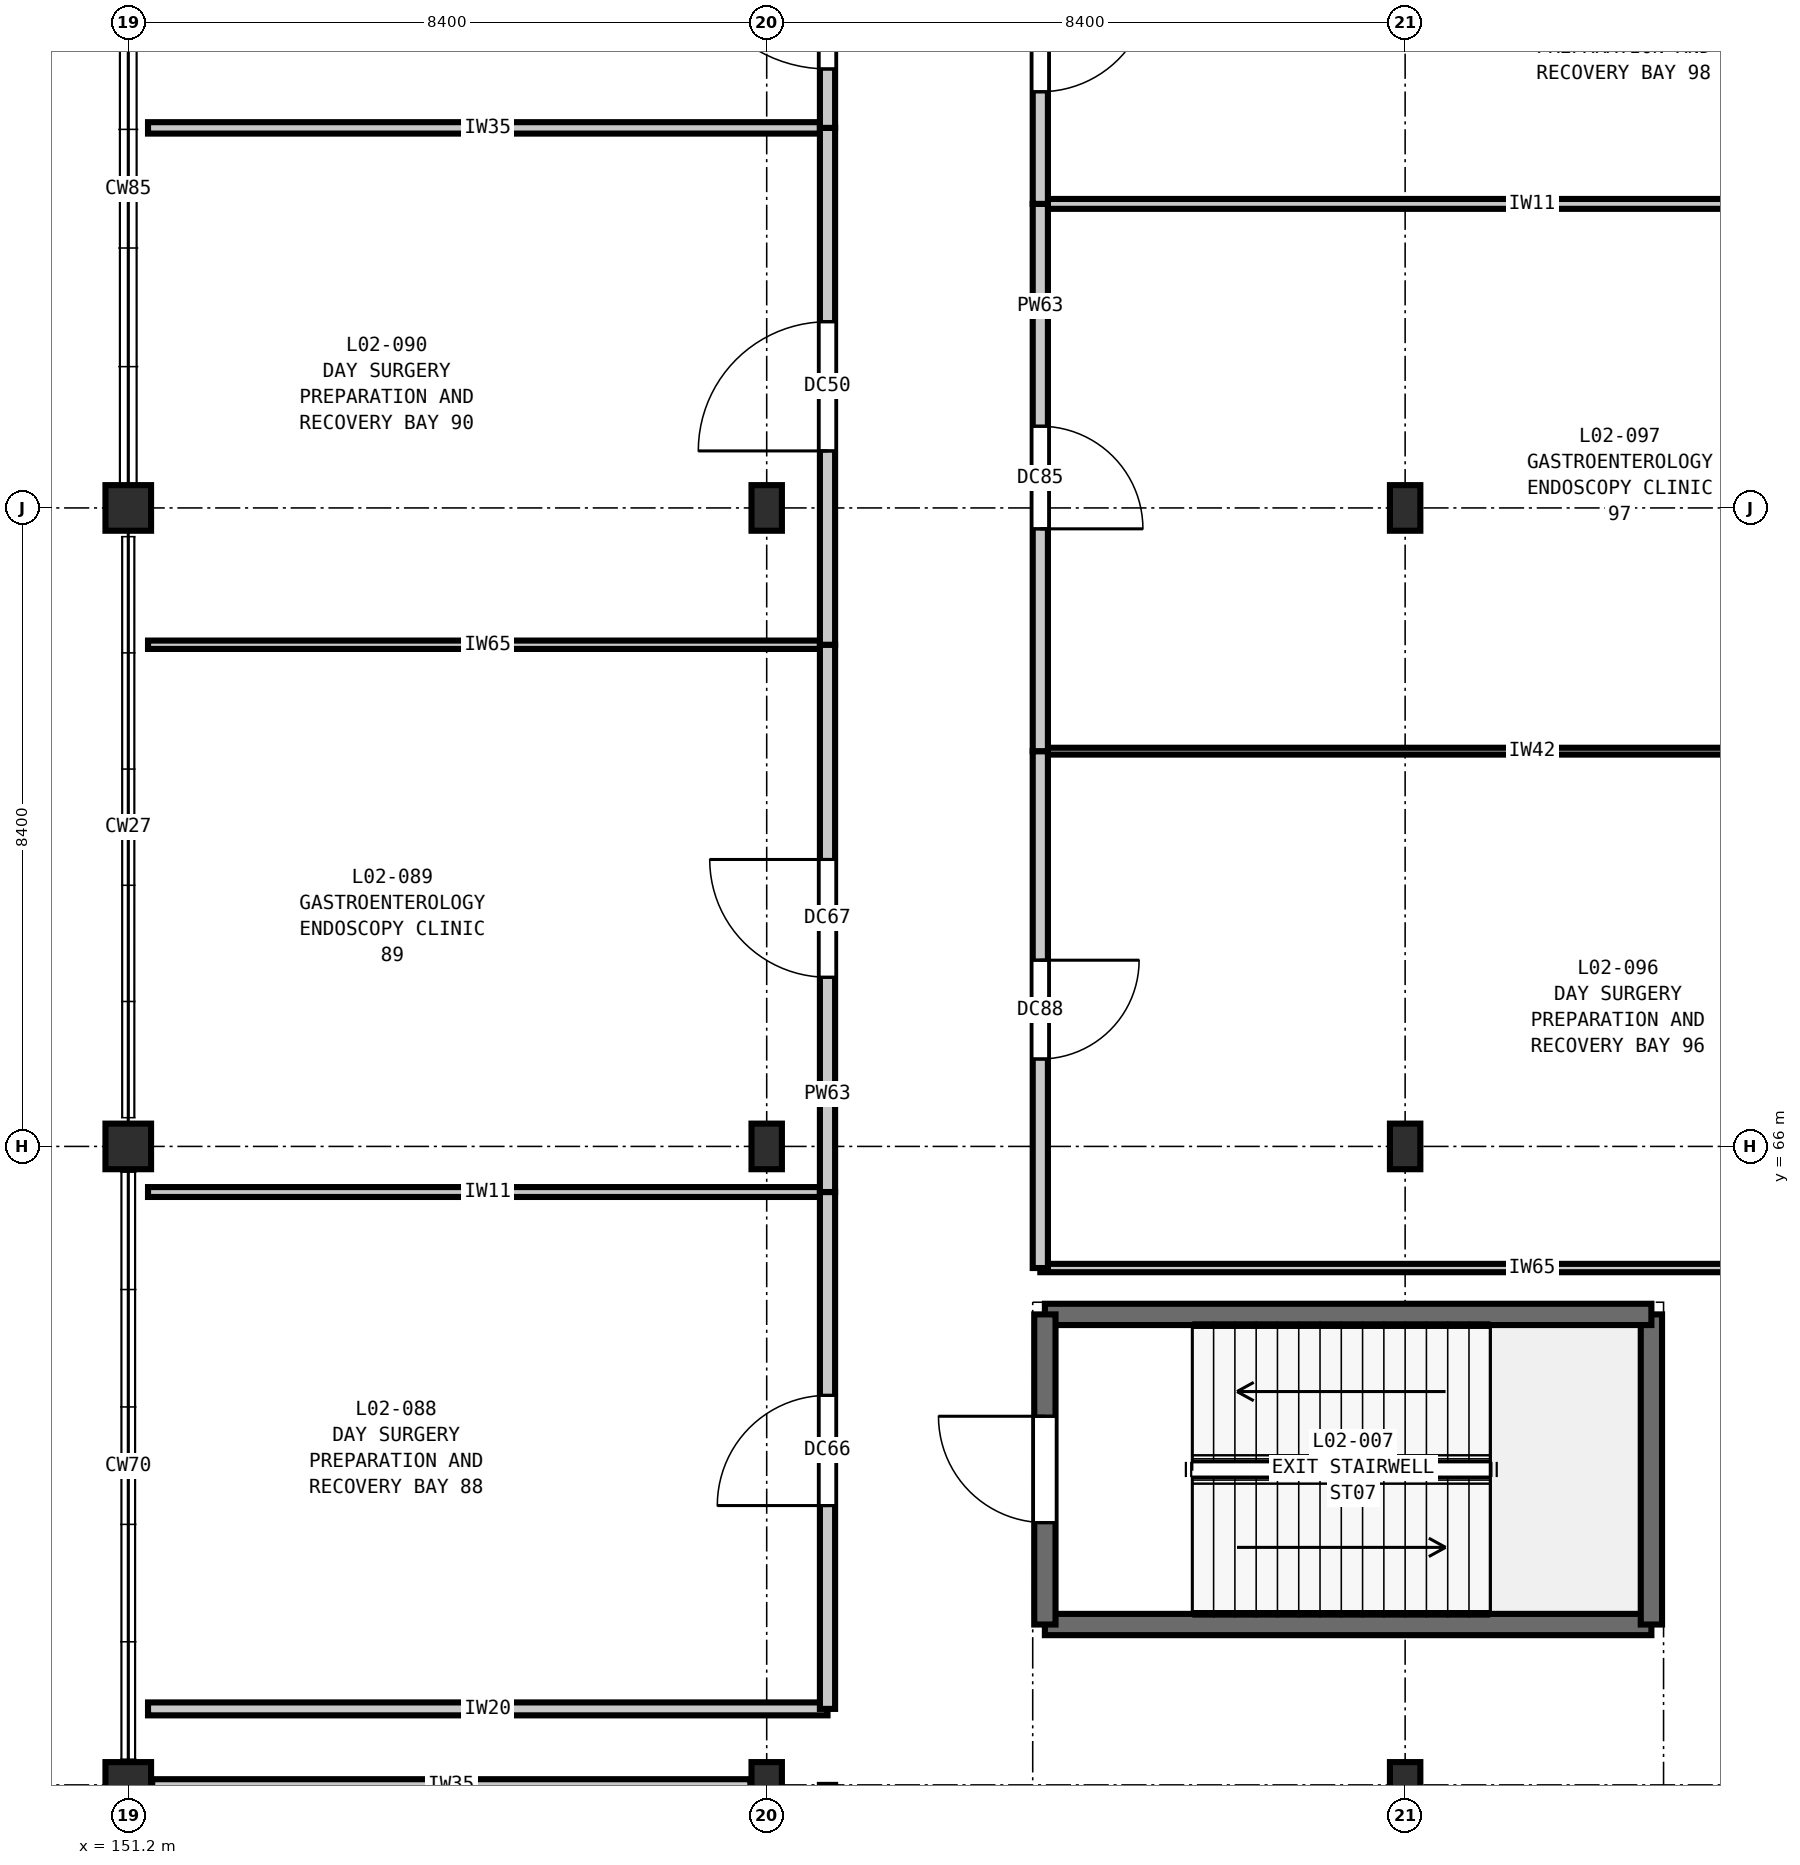
"""IFC4 building model, lengths in metres.
Left out: names, types, materials, properties, quantities, classifications, styles, units other than length and angle.
Written with IfcOpenShell. Run it as: python <this file> out.ifc"""

import sys

from ifc_helpers import new_model, si_unit, direction, frame, frame_2d, origin, origin_2d, place, context, subcontext, project, spatial, rectangle, extrude, element, fill, save


model = new_model("IFC4")
c1 = context("Model", 3, precision=1e-05, world=origin(), true_north=direction((0.0, 1.0)))
c2 = subcontext(c1, "Body", "Model", "MODEL_VIEW")
j1 = project(units=[si_unit("LENGTHUNIT", "METRE"), si_unit("PLANEANGLEUNIT", "RADIAN")], contexts=[c1])
p1 = place(None, origin())
s1 = spatial("IfcSite", under=j1, at=p1, CompositionType="ELEMENT")
p2 = place(p1, origin())
s2 = spatial("IfcBuilding", under=s1, at=p2, CompositionType="ELEMENT")
p3 = place(p2, frame((0.0, 0.0, 10.8)))
s3 = spatial("IfcBuildingStorey", under=s2, at=p3, CompositionType="ELEMENT", Elevation=10.8)
for number, where, z_axis, x_axis in (
    (1, (151.2, 57.6, 0.0), (0.0, 0.0, 1.0), (1.0, 0.0, 0.0)),
    (2, (151.2, 66.0, 0.0), (0.0, 0.0, 1.0), (1.0, 0.0, 0.0)),
    (3, (151.2, 74.4, 0.0), (0.0, 0.0, 1.0), (1.0, 0.0, 0.0)),
):
    element("IfcColumn", number, at=place(p3, frame(where, z_axis=z_axis, x_axis=x_axis)), inside=s3, PredefinedType="COLUMN", context=c2, shape_type="SweptSolid", body=[
        extrude(rectangle(XDim=0.6, YDim=0.6, at=origin_2d()), origin(), (0.0, 0.0, 1.0), 5.4),
    ])
for number, where, z_axis, x_axis in (
    (4, (159.6, 57.6, 0.0), (0.0, 0.0, 1.0), (1.0, 0.0, 0.0)),
    (5, (159.6, 66.0, 0.0), (0.0, 0.0, 1.0), (1.0, 0.0, 0.0)),
    (6, (159.6, 74.4, 0.0), (0.0, 0.0, 1.0), (1.0, 0.0, 0.0)),
    (7, (168.0, 57.6, 0.0), (0.0, 0.0, 1.0), (1.0, 0.0, 0.0)),
    (8, (168.0, 66.0, 0.0), (0.0, 0.0, 1.0), (1.0, 0.0, 0.0)),
    (9, (168.0, 74.4, 0.0), (0.0, 0.0, 1.0), (1.0, 0.0, 0.0)),
):
    element("IfcColumn", number, at=place(p3, frame(where, z_axis=z_axis, x_axis=x_axis)), inside=s3, PredefinedType="COLUMN", context=c2, shape_type="SweptSolid", body=[
        extrude(rectangle(XDim=0.4, YDim=0.6, at=origin_2d()), origin(), (0.0, 0.0, 1.0), 5.4),
    ])
p4 = place(p3, frame((163.26, 59.71, 0.0), z_axis=(0.0, 0.0, 1.0), x_axis=(1.0, 0.0, 0.0)))
e10 = element("IfcWall", 10, at=p4, inside=s3, PredefinedType="SHEAR", context=c2, shape_type="SweptSolid", body=[
    extrude(rectangle(XDim=7.98, YDim=0.28, at=frame_2d((3.99, 0.0))), origin(), (0.0, 0.0, 1.0), 5.4),
])
p5 = place(p3, frame((171.24, 59.71, 0.0), z_axis=(0.0, 0.0, 1.0), x_axis=(0.0, 1.0, 0.0)))
e11 = element("IfcWall", 11, at=p5, inside=s3, PredefinedType="SHEAR", context=c2, shape_type="SweptSolid", body=[
    extrude(rectangle(XDim=4.08, YDim=0.28, at=frame_2d((2.04, 0.0))), origin(), (0.0, 0.0, 1.0), 5.4),
])
p6 = place(p3, frame((171.24, 63.79, 0.0), z_axis=(0.0, 0.0, 1.0), x_axis=(-1.0, 0.0, 0.0)))
e12 = element("IfcWall", 12, at=p6, inside=s3, PredefinedType="SHEAR", context=c2, shape_type="SweptSolid", body=[
    extrude(rectangle(XDim=7.98, YDim=0.28, at=frame_2d((3.99, 0.0))), origin(), (0.0, 0.0, 1.0), 5.4),
])
p7 = place(p3, frame((163.26, 63.79, 0.0), z_axis=(0.0, 0.0, 1.0), x_axis=(0.0, -1.0, 0.0)))
e13 = element("IfcWall", 13, at=p7, inside=s3, PredefinedType="SHEAR", context=c2, shape_type="SweptSolid", body=[
    extrude(rectangle(XDim=4.08, YDim=0.28, at=frame_2d((2.04, 0.0))), origin(), (0.0, 0.0, 1.0), 5.4),
])
p8 = place(p7, frame((1.34, 0.0, 0.0)))
e14 = element("IfcOpeningElement", 14, at=p8, cuts=e13, PredefinedType="OPENING", context=c2, shape_type="SweptSolid", body=[
    extrude(rectangle(XDim=1.4, YDim=2.2, at=frame_2d((0.7, 1.1))), frame((0.0, 0.15, 0.0), z_axis=(0.0, -1.0, 0.0), x_axis=(1.0, 0.0, 0.0)), (0.0, 0.0, 1.0), 0.3),
])
p9 = place(p3, frame((151.515, 57.6, 0.0), z_axis=(0.0, 0.0, 1.0), x_axis=(1.0, 0.0, 0.0)))
e15 = element("IfcWall", 15, at=p9, inside=s3, PredefinedType="PARTITIONING", context=c2, shape_type="SweptSolid", body=[
    extrude(rectangle(XDim=7.87, YDim=0.15, at=frame_2d((3.935, 0.0))), origin(), (0.0, 0.0, 1.0), 4.735),
])
p10 = place(p3, frame((151.46, 58.6, 0.0), z_axis=(0.0, 0.0, 1.0), x_axis=(1.0, 0.0, 0.0)))
e16 = element("IfcWall", 16, at=p10, inside=s3, PredefinedType="PARTITIONING", context=c2, shape_type="SweptSolid", body=[
    extrude(rectangle(XDim=8.94, YDim=0.17, at=frame_2d((4.47, 0.0))), origin(), (0.0, 0.0, 1.0), 5.07),
])
p11 = place(p3, frame((163.2, 64.4, 0.0), z_axis=(0.0, 0.0, 1.0), x_axis=(1.0, 0.0, 0.0)))
e17 = element("IfcWall", 17, at=p11, inside=s3, PredefinedType="PARTITIONING", context=c2, shape_type="SweptSolid", body=[
    extrude(rectangle(XDim=12.94, YDim=0.11, at=frame_2d((6.47, 0.0))), origin(), (0.0, 0.0, 1.0), 5.07),
])
p12 = place(p3, frame((151.46, 65.4, 0.0), z_axis=(0.0, 0.0, 1.0), x_axis=(1.0, 0.0, 0.0)))
e18 = element("IfcWall", 18, at=p12, inside=s3, PredefinedType="PARTITIONING", context=c2, shape_type="SweptSolid", body=[
    extrude(rectangle(XDim=8.94, YDim=0.13, at=frame_2d((4.47, 0.0))), origin(), (0.0, 0.0, 1.0), 5.07),
])
p13 = place(p3, frame((163.2, 71.2, 0.0), z_axis=(0.0, 0.0, 1.0), x_axis=(1.0, 0.0, 0.0)))
e19 = element("IfcWall", 19, at=p13, inside=s3, PredefinedType="PARTITIONING", context=c2, shape_type="SweptSolid", body=[
    extrude(rectangle(XDim=12.94, YDim=0.09, at=frame_2d((6.47, 0.0))), origin(), (0.0, 0.0, 1.0), 5.07),
])
p14 = place(p3, frame((151.46, 72.6, 0.0), z_axis=(0.0, 0.0, 1.0), x_axis=(1.0, 0.0, 0.0)))
e20 = element("IfcWall", 20, at=p14, inside=s3, PredefinedType="PARTITIONING", context=c2, shape_type="SweptSolid", body=[
    extrude(rectangle(XDim=8.94, YDim=0.11, at=frame_2d((4.47, 0.0))), origin(), (0.0, 0.0, 1.0), 5.07),
])
p15 = place(p3, frame((163.2, 78.4, 0.0), z_axis=(0.0, 0.0, 1.0), x_axis=(1.0, 0.0, 0.0)))
e21 = element("IfcWall", 21, at=p15, inside=s3, PredefinedType="PARTITIONING", context=c2, shape_type="SweptSolid", body=[
    extrude(rectangle(XDim=12.94, YDim=0.13, at=frame_2d((6.47, 0.0))), origin(), (0.0, 0.0, 1.0), 5.07),
])
p16 = place(p3, frame((151.46, 79.4, 0.0), z_axis=(0.0, 0.0, 1.0), x_axis=(1.0, 0.0, 0.0)))
e22 = element("IfcWall", 22, at=p16, inside=s3, PredefinedType="PARTITIONING", context=c2, shape_type="SweptSolid", body=[
    extrude(rectangle(XDim=8.94, YDim=0.15, at=frame_2d((4.47, 0.0))), origin(), (0.0, 0.0, 1.0), 5.07),
])
p17 = place(p3, frame((160.4, 58.6, 0.0), z_axis=(0.0, 0.0, 1.0), x_axis=(0.0, 1.0, 0.0)))
e23 = element("IfcWall", 23, at=p17, inside=s3, PredefinedType="PARTITIONING", context=c2, shape_type="SweptSolid", body=[
    extrude(rectangle(XDim=6.8, YDim=0.2, at=frame_2d((3.4, 0.0))), origin(), (0.0, 0.0, 1.0), 5.07),
])
p18 = place(p17, frame((2.675, 0.0, 0.0)))
e24 = element("IfcOpeningElement", 24, at=p18, cuts=e23, PredefinedType="OPENING", context=c2, shape_type="SweptSolid", body=[
    extrude(rectangle(XDim=1.45, YDim=2.25, at=frame_2d((0.725, 1.125))), frame((0.0, 0.11, 0.0), z_axis=(0.0, -1.0, 0.0), x_axis=(1.0, 0.0, 0.0)), (0.0, 0.0, 1.0), 0.22),
])
p19 = place(p3, frame((160.4, 65.4, 0.0), z_axis=(0.0, 0.0, 1.0), x_axis=(0.0, 1.0, 0.0)))
e25 = element("IfcWall", 25, at=p19, inside=s3, PredefinedType="PARTITIONING", context=c2, shape_type="SweptSolid", body=[
    extrude(rectangle(XDim=7.2, YDim=0.2, at=frame_2d((3.6, 0.0))), origin(), (0.0, 0.0, 1.0), 5.07),
])
p20 = place(p19, frame((2.825, 0.0, 0.0)))
e26 = element("IfcOpeningElement", 26, at=p20, cuts=e25, PredefinedType="OPENING", context=c2, shape_type="SweptSolid", body=[
    extrude(rectangle(XDim=1.55, YDim=2.25, at=frame_2d((0.775, 1.125))), frame((0.0, 0.11, 0.0), z_axis=(0.0, -1.0, 0.0), x_axis=(1.0, 0.0, 0.0)), (0.0, 0.0, 1.0), 0.22),
])
p21 = place(p3, frame((160.4, 72.6, 0.0), z_axis=(0.0, 0.0, 1.0), x_axis=(0.0, 1.0, 0.0)))
e27 = element("IfcWall", 27, at=p21, inside=s3, PredefinedType="PARTITIONING", context=c2, shape_type="SweptSolid", body=[
    extrude(rectangle(XDim=6.8, YDim=0.2, at=frame_2d((3.4, 0.0))), origin(), (0.0, 0.0, 1.0), 5.07),
])
p22 = place(p21, frame((2.55, 0.0, 0.0)))
e28 = element("IfcOpeningElement", 28, at=p22, cuts=e27, PredefinedType="OPENING", context=c2, shape_type="SweptSolid", body=[
    extrude(rectangle(XDim=1.7, YDim=2.3, at=frame_2d((0.85, 1.15))), frame((0.0, 0.11, 0.0), z_axis=(0.0, -1.0, 0.0), x_axis=(1.0, 0.0, 0.0)), (0.0, 0.0, 1.0), 0.22),
])
p23 = place(p3, frame((160.4, 79.4, 0.0), z_axis=(0.0, 0.0, 1.0), x_axis=(0.0, 1.0, 0.0)))
e29 = element("IfcWall", 29, at=p23, inside=s3, PredefinedType="PARTITIONING", context=c2, shape_type="SweptSolid", body=[
    extrude(rectangle(XDim=3.4, YDim=0.2, at=frame_2d((1.7, 0.0))), origin(), (0.0, 0.0, 1.0), 5.07),
])
p24 = place(p23, frame((0.775, 0.0, 0.0)))
e30 = element("IfcOpeningElement", 30, at=p24, cuts=e29, PredefinedType="OPENING", context=c2, shape_type="SweptSolid", body=[
    extrude(rectangle(XDim=1.85, YDim=2.3, at=frame_2d((0.925, 1.15))), frame((0.0, 0.11, 0.0), z_axis=(0.0, -1.0, 0.0), x_axis=(1.0, 0.0, 0.0)), (0.0, 0.0, 1.0), 0.22),
])
p25 = place(p3, frame((163.2, 64.4, 0.0), z_axis=(0.0, 0.0, 1.0), x_axis=(0.0, 1.0, 0.0)))
e31 = element("IfcWall", 31, at=p25, inside=s3, PredefinedType="PARTITIONING", context=c2, shape_type="SweptSolid", body=[
    extrude(rectangle(XDim=6.8, YDim=0.2, at=frame_2d((3.4, 0.0))), origin(), (0.0, 0.0, 1.0), 5.07),
])
p26 = place(p25, frame((2.75, 0.0, 0.0)))
e32 = element("IfcOpeningElement", 32, at=p26, cuts=e31, PredefinedType="OPENING", context=c2, shape_type="SweptSolid", body=[
    extrude(rectangle(XDim=1.3, YDim=2.2, at=frame_2d((0.65, 1.1))), frame((0.0, 0.11, 0.0), z_axis=(0.0, -1.0, 0.0), x_axis=(1.0, 0.0, 0.0)), (0.0, 0.0, 1.0), 0.22),
])
p27 = place(p3, frame((163.2, 71.2, 0.0), z_axis=(0.0, 0.0, 1.0), x_axis=(0.0, 1.0, 0.0)))
e33 = element("IfcWall", 33, at=p27, inside=s3, PredefinedType="PARTITIONING", context=c2, shape_type="SweptSolid", body=[
    extrude(rectangle(XDim=7.2, YDim=0.2, at=frame_2d((3.6, 0.0))), origin(), (0.0, 0.0, 1.0), 5.07),
])
p28 = place(p27, frame((2.925, 0.0, 0.0)))
e34 = element("IfcOpeningElement", 34, at=p28, cuts=e33, PredefinedType="OPENING", context=c2, shape_type="SweptSolid", body=[
    extrude(rectangle(XDim=1.35, YDim=2.2, at=frame_2d((0.675, 1.1))), frame((0.0, 0.11, 0.0), z_axis=(0.0, -1.0, 0.0), x_axis=(1.0, 0.0, 0.0)), (0.0, 0.0, 1.0), 0.22),
])
p29 = place(p3, frame((163.2, 78.4, 0.0), z_axis=(0.0, 0.0, 1.0), x_axis=(0.0, 1.0, 0.0)))
e35 = element("IfcWall", 35, at=p29, inside=s3, PredefinedType="PARTITIONING", context=c2, shape_type="SweptSolid", body=[
    extrude(rectangle(XDim=4.4, YDim=0.2, at=frame_2d((2.2, 0.0))), origin(), (0.0, 0.0, 1.0), 5.07),
])
p30 = place(p29, frame((1.475, 0.0, 0.0)))
e36 = element("IfcOpeningElement", 36, at=p30, cuts=e35, PredefinedType="OPENING", context=c2, shape_type="SweptSolid", body=[
    extrude(rectangle(XDim=1.45, YDim=2.25, at=frame_2d((0.725, 1.125))), frame((0.0, 0.11, 0.0), z_axis=(0.0, -1.0, 0.0), x_axis=(1.0, 0.0, 0.0)), (0.0, 0.0, 1.0), 0.22),
])
p31 = place(p8, frame((1.4, 0.0, 0.0), z_axis=(0.0, 0.0, 1.0), x_axis=(-1.0, 0.0, 0.0)))
e37 = element("IfcDoor", 37, at=p31, inside=s3, OperationType="SINGLE_SWING_RIGHT", PredefinedType="DOOR", context=c2, shape_type="SweptSolid", body=[
    extrude(rectangle(XDim=1.4, YDim=2.2, at=frame_2d((0.7, 1.1))), frame((0.0, 0.025, 0.0), z_axis=(0.0, -1.0, 0.0), x_axis=(1.0, 0.0, 0.0)), (0.0, 0.0, 1.0), 0.05),
])
fill(e14, e37)
p32 = place(p18, origin())
e38 = element("IfcDoor", 38, at=p32, inside=s3, OperationType="SINGLE_SWING_LEFT", PredefinedType="DOOR", context=c2, shape_type="SweptSolid", body=[
    extrude(rectangle(XDim=1.45, YDim=2.25, at=frame_2d((0.725, 1.125))), frame((0.0, 0.025, 0.0), z_axis=(0.0, -1.0, 0.0), x_axis=(1.0, 0.0, 0.0)), (0.0, 0.0, 1.0), 0.05),
])
fill(e24, e38)
p33 = place(p20, origin())
e39 = element("IfcDoor", 39, at=p33, inside=s3, OperationType="SINGLE_SWING_RIGHT", PredefinedType="DOOR", context=c2, shape_type="SweptSolid", body=[
    extrude(rectangle(XDim=1.55, YDim=2.25, at=frame_2d((0.775, 1.125))), frame((0.0, 0.025, 0.0), z_axis=(0.0, -1.0, 0.0), x_axis=(1.0, 0.0, 0.0)), (0.0, 0.0, 1.0), 0.05),
])
fill(e26, e39)
p34 = place(p22, origin())
e40 = element("IfcDoor", 40, at=p34, inside=s3, OperationType="SINGLE_SWING_LEFT", PredefinedType="DOOR", context=c2, shape_type="SweptSolid", body=[
    extrude(rectangle(XDim=1.7, YDim=2.3, at=frame_2d((0.85, 1.15))), frame((0.0, 0.025, 0.0), z_axis=(0.0, -1.0, 0.0), x_axis=(1.0, 0.0, 0.0)), (0.0, 0.0, 1.0), 0.05),
])
fill(e28, e40)
p35 = place(p24, origin())
e41 = element("IfcDoor", 41, at=p35, inside=s3, OperationType="SINGLE_SWING_RIGHT", PredefinedType="DOOR", context=c2, shape_type="SweptSolid", body=[
    extrude(rectangle(XDim=1.85, YDim=2.3, at=frame_2d((0.925, 1.15))), frame((0.0, 0.025, 0.0), z_axis=(0.0, -1.0, 0.0), x_axis=(1.0, 0.0, 0.0)), (0.0, 0.0, 1.0), 0.05),
])
fill(e30, e41)
p36 = place(p26, frame((1.3, 0.0, 0.0), z_axis=(0.0, 0.0, 1.0), x_axis=(-1.0, 0.0, 0.0)))
e42 = element("IfcDoor", 42, at=p36, inside=s3, OperationType="SINGLE_SWING_LEFT", PredefinedType="DOOR", context=c2, shape_type="SweptSolid", body=[
    extrude(rectangle(XDim=1.3, YDim=2.2, at=frame_2d((0.65, 1.1))), frame((0.0, 0.025, 0.0), z_axis=(0.0, -1.0, 0.0), x_axis=(1.0, 0.0, 0.0)), (0.0, 0.0, 1.0), 0.05),
])
fill(e32, e42)
p37 = place(p28, frame((1.35, 0.0, 0.0), z_axis=(0.0, 0.0, 1.0), x_axis=(-1.0, 0.0, 0.0)))
e43 = element("IfcDoor", 43, at=p37, inside=s3, OperationType="SINGLE_SWING_RIGHT", PredefinedType="DOOR", context=c2, shape_type="SweptSolid", body=[
    extrude(rectangle(XDim=1.35, YDim=2.2, at=frame_2d((0.675, 1.1))), frame((0.0, 0.025, 0.0), z_axis=(0.0, -1.0, 0.0), x_axis=(1.0, 0.0, 0.0)), (0.0, 0.0, 1.0), 0.05),
])
fill(e34, e43)
p38 = place(p30, frame((1.45, 0.0, 0.0), z_axis=(0.0, 0.0, 1.0), x_axis=(-1.0, 0.0, 0.0)))
e44 = element("IfcDoor", 44, at=p38, inside=s3, OperationType="SINGLE_SWING_LEFT", PredefinedType="DOOR", context=c2, shape_type="SweptSolid", body=[
    extrude(rectangle(XDim=1.45, YDim=2.25, at=frame_2d((0.725, 1.125))), frame((0.0, 0.025, 0.0), z_axis=(0.0, -1.0, 0.0), x_axis=(1.0, 0.0, 0.0)), (0.0, 0.0, 1.0), 0.05),
])
fill(e36, e44)
save(model, sys.argv[1])
